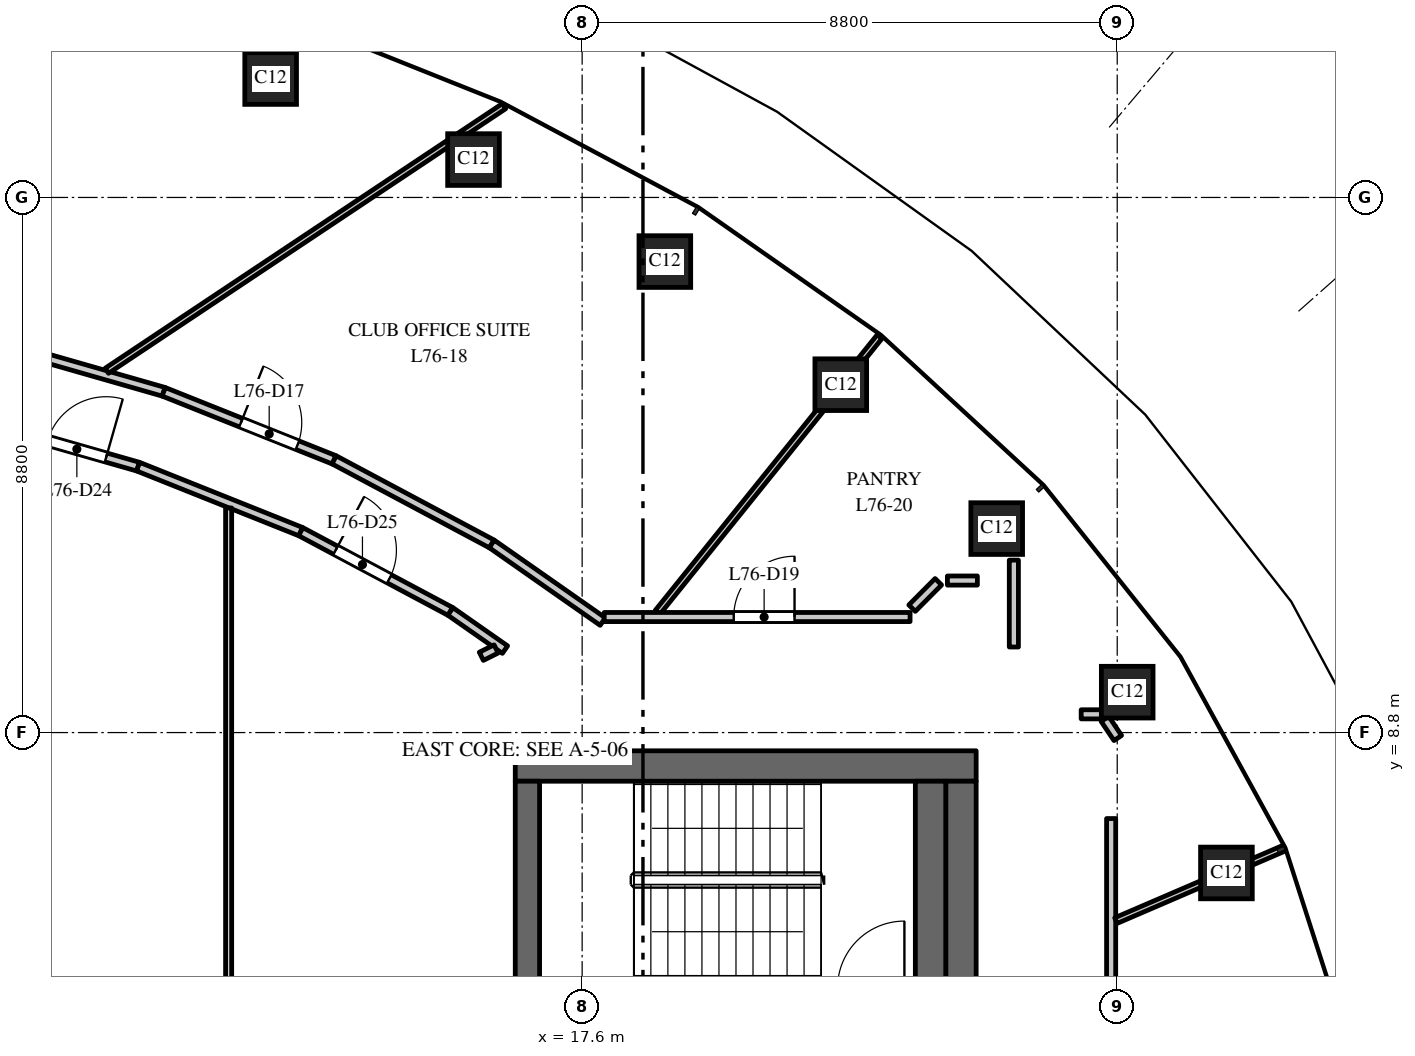
"""IFC4 building model, lengths in metres.
Left out: names, types, materials, properties, quantities, classifications, styles, units other than length and angle.
Written with IfcOpenShell. Run it as: python <this file> out.ifc"""

import sys

from ifc_helpers import new_model, si_unit, direction, frame, frame_2d, origin, origin_2d, place, context, subcontext, project, spatial, rectangle, extrude, element, fill, save


model = new_model("IFC4")
c1 = context("Model", 3, precision=1e-05, world=origin(), true_north=direction((0.0, 1.0)))
c2 = subcontext(c1, "Body", "Model", "MODEL_VIEW")
j1 = project(units=[si_unit("LENGTHUNIT", "METRE"), si_unit("PLANEANGLEUNIT", "RADIAN")], contexts=[c1])
p1 = place(None, origin())
s1 = spatial("IfcSite", under=j1, at=p1, CompositionType="ELEMENT")
p2 = place(p1, origin())
s2 = spatial("IfcBuilding", under=s1, at=p2, CompositionType="ELEMENT")
p3 = place(p2, frame((0.0, 0.0, 347.0)))
s3 = spatial("IfcBuildingStorey", under=s2, at=p3, CompositionType="ELEMENT", Elevation=347.0)
p4 = place(p3, frame((28.196, 6.491, 0.021), z_axis=(-0.523716020233, -0.170699160403, 0.834615676098), x_axis=(0.309892926909, -0.950771462472, 0.0)))
e1 = element("IfcColumn", 1, at=p4, inside=s3, PredefinedType="COLUMN", context=c2, shape_type="SweptSolid", body=[
    extrude(rectangle(XDim=0.85, YDim=0.85, at=origin_2d()), origin(), (0.0, 0.0, 1.0), 4.707),
])
p5 = place(p3, frame((26.564, 9.464, 0.021), z_axis=(-0.491879634407, -0.247568905736, 0.834723943689), x_axis=(0.449578736033, -0.893240706701, 0.0)))
e2 = element("IfcColumn", 2, at=p5, inside=s3, PredefinedType="COLUMN", context=c2, shape_type="SweptSolid", body=[
    extrude(rectangle(XDim=0.85, YDim=0.85, at=origin_2d()), origin(), (0.0, 0.0, 1.0), 4.646),
])
p6 = place(p3, frame((24.418, 12.154, 0.021), z_axis=(-0.450739713419, -0.316171343674, 0.834787034031), x_axis=(0.574258734761, -0.81867387008, 0.0)))
e3 = element("IfcColumn", 3, at=p6, inside=s3, PredefinedType="COLUMN", context=c2, shape_type="SweptSolid", body=[
    extrude(rectangle(XDim=0.85, YDim=0.85, at=origin_2d()), origin(), (0.0, 0.0, 1.0), 4.744),
])
p7 = place(p3, frame((21.854, 14.521, 0.021), z_axis=(-0.402285560679, -0.375879123876, 0.834794113481), x_axis=(0.682718667605, -0.730681340192, 0.0)))
e4 = element("IfcColumn", 4, at=p7, inside=s3, PredefinedType="COLUMN", context=c2, shape_type="SweptSolid", body=[
    extrude(rectangle(XDim=0.85, YDim=0.85, at=origin_2d()), origin(), (0.0, 0.0, 1.0), 4.734),
])
p8 = place(p3, frame((18.96, 16.545, 0.021), z_axis=(-0.348267486207, -0.426502607868, 0.834748634939), x_axis=(0.774570364405, -0.632487747379, 0.0)))
e5 = element("IfcColumn", 5, at=p8, inside=s3, PredefinedType="COLUMN", context=c2, shape_type="SweptSolid", body=[
    extrude(rectangle(XDim=0.85, YDim=0.85, at=origin_2d()), origin(), (0.0, 0.0, 1.0), 4.734),
])
p9 = place(p3, frame((15.813, 18.223, 0.021), z_axis=(-0.28996437072, -0.468233413861, 0.834672471007), x_axis=(0.850179331562, -0.526493213807, 0.0)))
e6 = element("IfcColumn", 6, at=p9, inside=s3, PredefinedType="COLUMN", context=c2, shape_type="SweptSolid", body=[
    extrude(rectangle(XDim=0.85, YDim=0.85, at=origin_2d()), origin(), (0.0, 0.0, 1.0), 4.734),
])
p10 = place(p3, frame((12.477, 19.556, 0.021), z_axis=(-0.228477444955, -0.501144727492, 0.834656827237), x_axis=(0.909897792404, -0.41483250521, 0.0)))
e7 = element("IfcColumn", 7, at=p10, inside=s3, PredefinedType="COLUMN", context=c2, shape_type="SweptSolid", body=[
    extrude(rectangle(XDim=0.85, YDim=0.85, at=origin_2d()), origin(), (0.0, 0.0, 1.0), 4.735),
])
p11 = place(p3, frame((9.004, 20.549, 0.021), z_axis=(-0.164733398932, -0.525651643853, 0.834597661506), x_axis=(0.954238174044, -0.299047667099, 0.0)))
e8 = element("IfcColumn", 8, at=p11, inside=s3, PredefinedType="COLUMN", context=c2, shape_type="SweptSolid", body=[
    extrude(rectangle(XDim=0.85, YDim=0.85, at=origin_2d()), origin(), (0.0, 0.0, 1.0), 4.735),
])
p12 = place(p3, frame((16.5, 8.25, 0.0), z_axis=(0.0, 0.0, 1.0), x_axis=(1.0, 0.0, 0.0)))
e9 = element("IfcWall", 9, at=p12, inside=s3, PredefinedType="SHEAR", context=c2, shape_type="SweptSolid", body=[
    extrude(rectangle(XDim=7.58, YDim=0.5, at=frame_2d((3.79, 0.0))), origin(), (0.0, 0.0, 1.0), 3.7),
])
p13 = place(p3, frame((16.7, -8.0, 0.0), z_axis=(0.0, 0.0, 1.0), x_axis=(0.0, 1.0, 0.0)))
e10 = element("IfcWall", 10, at=p13, inside=s3, PredefinedType="SHEAR", context=c2, shape_type="SweptSolid", body=[
    extrude(rectangle(XDim=16.0, YDim=0.4, at=frame_2d((8.0, 0.0))), origin(), (0.0, 0.0, 1.0), 3.7),
])
p14 = place(p3, frame((23.83, -8.0, 0.0), z_axis=(0.0, 0.0, 1.0), x_axis=(0.0, 1.0, 0.0)))
e11 = element("IfcWall", 11, at=p14, inside=s3, PredefinedType="SHEAR", context=c2, shape_type="SweptSolid", body=[
    extrude(rectangle(XDim=16.0, YDim=0.5, at=frame_2d((8.0, 0.0))), origin(), (0.0, 0.0, 1.0), 3.7),
])
p15 = place(p14, frame((5.15, 0.0, 0.0)))
e12 = element("IfcOpeningElement", 12, at=p15, cuts=e11, PredefinedType="OPENING", context=c2, shape_type="SweptSolid", body=[
    extrude(rectangle(XDim=1.1, YDim=2.1, at=frame_2d((0.55, 1.05))), frame((0.0, 0.26, 0.0), z_axis=(0.0, -1.0, 0.0), x_axis=(1.0, 0.0, 0.0)), (0.0, 0.0, 1.0), 0.52),
])
p16 = place(p14, frame((10.85, 0.0, 0.0)))
e13 = element("IfcOpeningElement", 13, at=p16, cuts=e11, PredefinedType="OPENING", context=c2, shape_type="SweptSolid", body=[
    extrude(rectangle(XDim=1.0, YDim=2.1, at=frame_2d((0.5, 1.05))), frame((0.0, 0.26, 0.0), z_axis=(0.0, -1.0, 0.0), x_axis=(1.0, 0.0, 0.0)), (0.0, 0.0, 1.0), 0.52),
])
p17 = place(p14, frame((8.46, 0.0, 0.0)))
e14 = element("IfcOpeningElement", 14, at=p17, cuts=e11, PredefinedType="OPENING", context=c2, shape_type="SweptSolid", body=[
    extrude(rectangle(XDim=1.2, YDim=2.1, at=frame_2d((0.6, 1.05))), frame((0.0, 0.26, 0.0), z_axis=(0.0, -1.0, 0.0), x_axis=(1.0, 0.0, 0.0)), (0.0, 0.0, 1.0), 0.52),
])
p18 = place(p3, frame((23.33, 4.45, 0.0), z_axis=(0.0, 0.0, 1.0), x_axis=(0.0, 1.0, 0.0)))
e15 = element("IfcWall", 15, at=p18, inside=s3, PredefinedType="SHEAR", context=c2, shape_type="SweptSolid", body=[
    extrude(rectangle(XDim=3.55, YDim=0.5, at=frame_2d((1.775, 0.0))), origin(), (0.0, 0.0, 1.0), 3.7),
])
p19 = place(p3, frame((7.463, 13.983, 0.0), z_axis=(0.0, 0.0, 1.0), x_axis=(0.961520822089, -0.274732067092, 0.0)))
e16 = element("IfcWall", 16, at=p19, inside=s3, PredefinedType="PARTITIONING", context=c2, shape_type="SweptSolid", body=[
    extrude(rectangle(XDim=2.948, YDim=0.15, at=frame_2d((1.474, 0.0))), origin(), (0.0, 0.0, 1.0), 2.95),
])
p20 = place(p19, frame((1.4, 0.0, 0.0)))
e17 = element("IfcOpeningElement", 17, at=p20, cuts=e16, PredefinedType="OPENING", context=c2, shape_type="SweptSolid", body=[
    extrude(rectangle(XDim=1.0, YDim=2.1, at=frame_2d((0.5, 1.05))), frame((0.0, 0.085, 0.0), z_axis=(0.0, -1.0, 0.0), x_axis=(1.0, 0.0, 0.0)), (0.0, 0.0, 1.0), 0.17),
])
p21 = place(p3, frame((7.761, 15.25, 0.0), z_axis=(0.0, 0.0, 1.0), x_axis=(0.961431034977, -0.275046114283, 0.0)))
e18 = element("IfcWall", 18, at=p21, inside=s3, PredefinedType="PARTITIONING", context=c2, shape_type="SweptSolid", body=[
    extrude(rectangle(XDim=3.076, YDim=0.15, at=frame_2d((1.538, 0.0))), origin(), (0.0, 0.0, 1.0), 2.95),
])
p22 = place(p3, frame((9.783, 14.75, 0.0), z_axis=(0.0, 0.0, 1.0), x_axis=(0.832260803083, 0.554384303216, 0.0)))
e19 = element("IfcWall", 19, at=p22, inside=s3, PredefinedType="PARTITIONING", context=c2, shape_type="SweptSolid", body=[
    extrude(rectangle(XDim=7.848, YDim=0.1, at=frame_2d((3.924, 0.0))), origin(), (0.0, 0.0, 1.0), 2.95),
])
p23 = place(p3, frame((10.297, 13.173, 0.0), z_axis=(0.0, 0.0, 1.0), x_axis=(0.928576025609, -0.371142243168, 0.0)))
e20 = element("IfcWall", 20, at=p23, inside=s3, PredefinedType="PARTITIONING", context=c2, shape_type="SweptSolid", body=[
    extrude(rectangle(XDim=2.881, YDim=0.15, at=frame_2d((1.44, 0.0))), origin(), (0.0, 0.0, 1.0), 3.7),
])
p24 = place(p3, frame((10.718, 14.404, 0.0), z_axis=(0.0, 0.0, 1.0), x_axis=(0.928710811389, -0.370804839248, 0.0)))
e21 = element("IfcWall", 21, at=p24, inside=s3, PredefinedType="PARTITIONING", context=c2, shape_type="SweptSolid", body=[
    extrude(rectangle(XDim=3.018, YDim=0.15, at=frame_2d((1.509, 0.0))), origin(), (0.0, 0.0, 1.0), 3.7),
])
p25 = place(p24, frame((1.368, 0.0, 0.0)))
e22 = element("IfcOpeningElement", 22, at=p25, cuts=e21, PredefinedType="OPENING", context=c2, shape_type="SweptSolid", body=[
    extrude(rectangle(XDim=1.0, YDim=2.1, at=frame_2d((0.5, 1.05))), frame((0.0, 0.085, 0.0), z_axis=(0.0, -1.0, 0.0), x_axis=(1.0, 0.0, 0.0)), (0.0, 0.0, 1.0), 0.17),
])
p26 = place(p3, frame((11.786, -12.493, 0.0), z_axis=(0.0, 0.0, 1.0), x_axis=(0.0, 1.0, 0.0)))
e23 = element("IfcWall", 23, at=p26, inside=s3, PredefinedType="PARTITIONING", context=c2, shape_type="SweptSolid", body=[
    extrude(rectangle(XDim=24.986, YDim=0.1, at=frame_2d((12.493, 0.0))), origin(), (0.0, 0.0, 1.0), 2.95),
])
p27 = place(p3, frame((12.972, 12.104, 0.0), z_axis=(0.0, 0.0, 1.0), x_axis=(0.882445003112, -0.470415578487, 0.0)))
e24 = element("IfcWall", 24, at=p27, inside=s3, PredefinedType="PARTITIONING", context=c2, shape_type="SweptSolid", body=[
    extrude(rectangle(XDim=2.789, YDim=0.15, at=frame_2d((1.395, 0.0))), origin(), (0.0, 0.0, 1.0), 2.95),
])
p28 = place(p27, frame((0.65, 0.0, 0.0)))
e25 = element("IfcOpeningElement", 25, at=p28, cuts=e24, PredefinedType="OPENING", context=c2, shape_type="SweptSolid", body=[
    extrude(rectangle(XDim=1.0, YDim=2.1, at=frame_2d((0.5, 1.05))), frame((0.0, 0.085, 0.0), z_axis=(0.0, -1.0, 0.0), x_axis=(1.0, 0.0, 0.0)), (0.0, 0.0, 1.0), 0.17),
])
p29 = place(p3, frame((13.521, 13.285, 0.0), z_axis=(0.0, 0.0, 1.0), x_axis=(0.882371338396, -0.470553738883, 0.0)))
e26 = element("IfcWall", 26, at=p29, inside=s3, PredefinedType="PARTITIONING", context=c2, shape_type="SweptSolid", body=[
    extrude(rectangle(XDim=2.939, YDim=0.15, at=frame_2d((1.469, 0.0))), origin(), (0.0, 0.0, 1.0), 2.95),
])
p30 = place(p3, frame((15.433, 10.792, 0.0), z_axis=(0.0, 0.0, 1.0), x_axis=(0.819503988365, -0.573073479629, 0.0)))
e27 = element("IfcWall", 27, at=p30, inside=s3, PredefinedType="PARTITIONING", context=c2, shape_type="SweptSolid", body=[
    extrude(rectangle(XDim=1.096, YDim=0.15, at=frame_2d((0.548, 0.0))), origin(), (0.0, 0.0, 1.0), 3.7),
])
p31 = place(p3, frame((15.942, 10.054, 0.0), z_axis=(0.0, 0.0, 1.0), x_axis=(0.895145027055, 0.445775033553, 0.0)))
e28 = element("IfcWall", 28, at=p31, inside=s3, PredefinedType="PARTITIONING", context=c2, shape_type="SweptSolid", body=[
    extrude(rectangle(XDim=0.272, YDim=0.15, at=frame_2d((0.136, 0.0))), origin(), (0.0, 0.0, 1.0), 3.7),
])
p32 = place(p3, frame((16.114, 11.902, 0.0), z_axis=(0.0, 0.0, 1.0), x_axis=(0.819309152621, -0.573351996971, 0.0)))
e29 = element("IfcWall", 29, at=p32, inside=s3, PredefinedType="PARTITIONING", context=c2, shape_type="SweptSolid", body=[
    extrude(rectangle(XDim=2.228, YDim=0.15, at=frame_2d((1.114, 0.0))), origin(), (0.0, 0.0, 1.0), 3.7),
])
p33 = place(p3, frame((17.963, 10.7, 0.0), z_axis=(0.0, 0.0, 1.0), x_axis=(1.0, 0.0, 0.0)))
e30 = element("IfcWall", 30, at=p33, inside=s3, PredefinedType="PARTITIONING", context=c2, shape_type="SweptSolid", body=[
    extrude(rectangle(XDim=5.03, YDim=0.15, at=frame_2d((2.515, 0.0))), origin(), (0.0, 0.0, 1.0), 3.0),
])
p34 = place(p33, frame((2.13, 0.0, 0.0)))
e31 = element("IfcOpeningElement", 31, at=p34, cuts=e30, PredefinedType="OPENING", context=c2, shape_type="SweptSolid", body=[
    extrude(rectangle(XDim=1.0, YDim=2.1, at=frame_2d((0.5, 1.05))), frame((0.0, 0.085, 0.0), z_axis=(0.0, -1.0, 0.0), x_axis=(1.0, 0.0, 0.0)), (0.0, 0.0, 1.0), 0.17),
])
p35 = place(p3, frame((18.841, 10.778, 0.0), z_axis=(0.0, 0.0, 1.0), x_axis=(0.627259579643, 0.778810259143, 0.0)))
e32 = element("IfcWall", 32, at=p35, inside=s3, PredefinedType="PARTITIONING", context=c2, shape_type="SweptSolid", body=[
    extrude(rectangle(XDim=5.82, YDim=0.1, at=frame_2d((2.91, 0.0))), origin(), (0.0, 0.0, 1.0), 3.0),
])
p36 = place(p3, frame((23.607, 11.3, 0.0), z_axis=(0.0, 0.0, 1.0), x_axis=(1.0, 0.0, 0.0)))
e33 = element("IfcWall", 33, at=p36, inside=s3, PredefinedType="PARTITIONING", context=c2, shape_type="SweptSolid", body=[
    extrude(rectangle(XDim=0.493, YDim=0.15, at=frame_2d((0.247, 0.0))), origin(), (0.0, 0.0, 1.0), 3.7),
])
p37 = place(p3, frame((24.7, 10.207, 0.0), z_axis=(0.0, 0.0, 1.0), x_axis=(0.0, 1.0, 0.0)))
e34 = element("IfcWall", 34, at=p37, inside=s3, PredefinedType="PARTITIONING", context=c2, shape_type="SweptSolid", body=[
    extrude(rectangle(XDim=1.429, YDim=0.15, at=frame_2d((0.714, 0.0))), origin(), (0.0, 0.0, 1.0), 3.7),
])
p38 = place(p3, frame((25.807, 9.1, 0.0), z_axis=(0.0, 0.0, 1.0), x_axis=(1.0, 0.0, 0.0)))
e35 = element("IfcWall", 35, at=p38, inside=s3, PredefinedType="PARTITIONING", context=c2, shape_type="SweptSolid", body=[
    extrude(rectangle(XDim=0.431, YDim=0.15, at=frame_2d((0.216, 0.0))), origin(), (0.0, 0.0, 1.0), 3.7),
])
p39 = place(p3, frame((26.198, 9.025, 0.0), z_axis=(0.0, 0.0, 1.0), x_axis=(0.556482519592, -0.830859317447, 0.0)))
e36 = element("IfcWall", 36, at=p39, inside=s3, PredefinedType="PARTITIONING", context=c2, shape_type="SweptSolid", body=[
    extrude(rectangle(XDim=0.379, YDim=0.15, at=frame_2d((0.189, 0.0))), origin(), (0.0, 0.0, 1.0), 3.7),
])
p40 = place(p3, frame((26.3, -7.393, 0.0), z_axis=(0.0, 0.0, 1.0), x_axis=(0.0, 1.0, 0.0)))
e37 = element("IfcWall", 37, at=p40, inside=s3, PredefinedType="PARTITIONING", context=c2, shape_type="SweptSolid", body=[
    extrude(rectangle(XDim=14.779, YDim=0.15, at=frame_2d((7.39, 0.0))), origin(), (0.0, 0.0, 1.0), 3.0),
])
p41 = place(p40, frame((8.359, 0.0, 0.0)))
e38 = element("IfcOpeningElement", 38, at=p41, cuts=e37, PredefinedType="OPENING", context=c2, shape_type="SweptSolid", body=[
    extrude(rectangle(XDim=1.0, YDim=2.1, at=frame_2d((0.5, 1.05))), frame((0.0, 0.085, 0.0), z_axis=(0.0, -1.0, 0.0), x_axis=(1.0, 0.0, 0.0)), (0.0, 0.0, 1.0), 0.17),
])
p42 = place(p3, frame((26.379, 5.708, 0.0), z_axis=(0.0, 0.0, 1.0), x_axis=(0.918524584495, 0.395363867442, 0.0)))
e39 = element("IfcWall", 39, at=p42, inside=s3, PredefinedType="PARTITIONING", context=c2, shape_type="SweptSolid", body=[
    extrude(rectangle(XDim=2.997, YDim=0.1, at=frame_2d((1.499, 0.0))), origin(), (0.0, 0.0, 1.0), 3.7),
])
p43 = place(p3, frame((23.026, 10.846, 0.0), z_axis=(0.0, 0.0, 1.0), x_axis=(0.70551060944, 0.708699357957, 0.0)))
e40 = element("IfcWall", 40, at=p43, inside=s3, PredefinedType="PARTITIONING", context=c2, shape_type="SweptSolid", body=[
    extrude(rectangle(XDim=0.613, YDim=0.15, at=frame_2d((0.306, 0.0))), origin(), (0.0, 0.0, 1.0), 3.7),
])
p44 = place(p25, origin())
e41 = element("IfcDoor", 41, at=p44, inside=s3, OperationType="SINGLE_SWING_LEFT", PredefinedType="DOOR", context=c2, shape_type="SweptSolid", body=[
    extrude(rectangle(XDim=1.0, YDim=2.1, at=frame_2d((0.5, 1.05))), frame((0.0, 0.025, 0.0), z_axis=(0.0, -1.0, 0.0), x_axis=(1.0, 0.0, 0.0)), (0.0, 0.0, 1.0), 0.05),
])
fill(e22, e41)
p45 = place(p34, origin())
e42 = element("IfcDoor", 42, at=p45, inside=s3, OperationType="SINGLE_SWING_RIGHT", PredefinedType="DOOR", context=c2, shape_type="SweptSolid", body=[
    extrude(rectangle(XDim=1.0, YDim=2.1, at=frame_2d((0.5, 1.05))), frame((0.0, 0.025, 0.0), z_axis=(0.0, -1.0, 0.0), x_axis=(1.0, 0.0, 0.0)), (0.0, 0.0, 1.0), 0.05),
])
fill(e31, e42)
p46 = place(p20, origin())
e43 = element("IfcDoor", 43, at=p46, inside=s3, OperationType="SINGLE_SWING_RIGHT", PredefinedType="DOOR", context=c2, shape_type="SweptSolid", body=[
    extrude(rectangle(XDim=1.0, YDim=2.1, at=frame_2d((0.5, 1.05))), frame((0.0, 0.025, 0.0), z_axis=(0.0, -1.0, 0.0), x_axis=(1.0, 0.0, 0.0)), (0.0, 0.0, 1.0), 0.05),
])
fill(e17, e43)
p47 = place(p28, origin())
e44 = element("IfcDoor", 44, at=p47, inside=s3, OperationType="SINGLE_SWING_LEFT", PredefinedType="DOOR", context=c2, shape_type="SweptSolid", body=[
    extrude(rectangle(XDim=1.0, YDim=2.1, at=frame_2d((0.5, 1.05))), frame((0.0, 0.025, 0.0), z_axis=(0.0, -1.0, 0.0), x_axis=(1.0, 0.0, 0.0)), (0.0, 0.0, 1.0), 0.05),
])
fill(e25, e44)
save(model, sys.argv[1])
